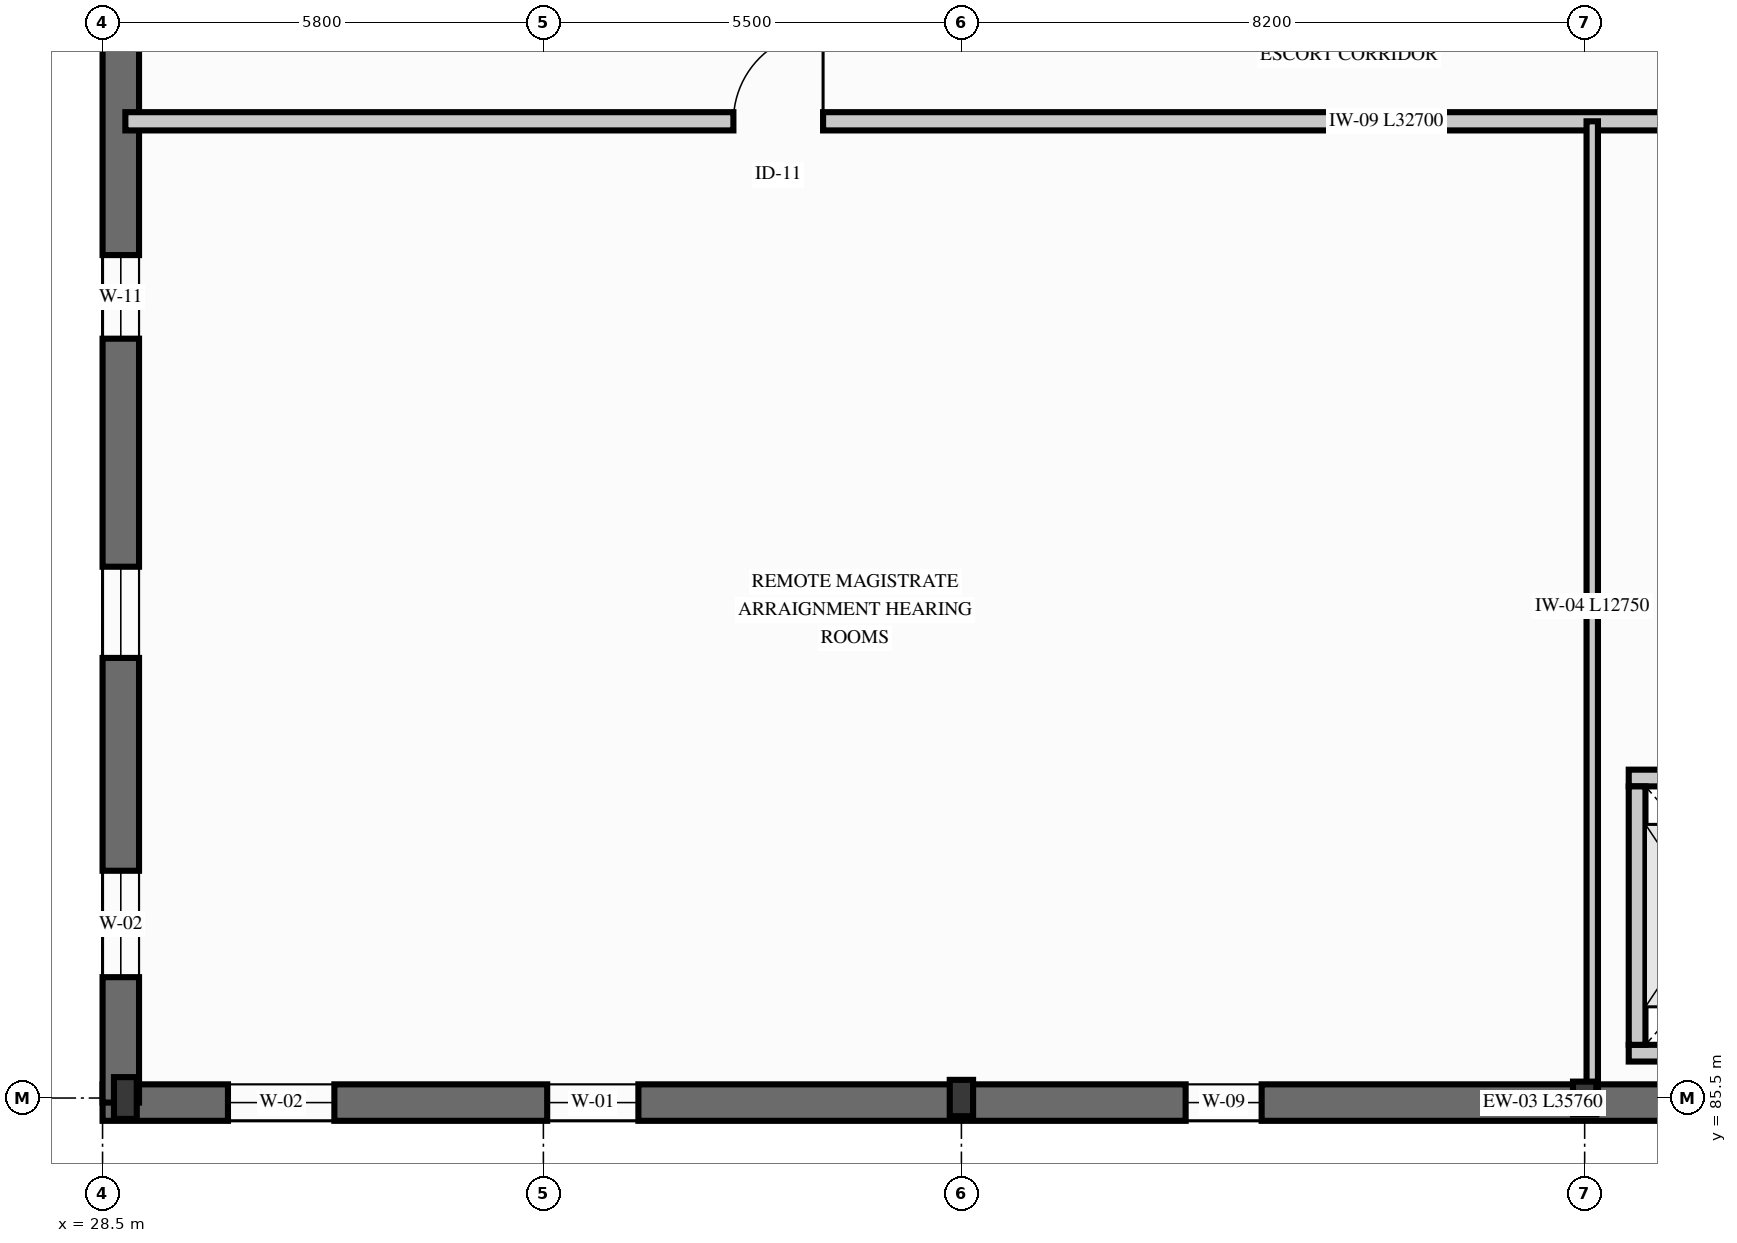
"""IFC4 building model, lengths in metres.
Left out: names, types, materials, properties, quantities, classifications, styles, units other than length and angle.
Written with IfcOpenShell. Run it as: python <this file> out.ifc"""

import sys

from ifc_helpers import new_model, si_unit, direction, frame, frame_2d, origin, origin_2d, place, context, subcontext, project, spatial, rectangle, i_section, extrude, element, fill, save


model = new_model("IFC4")
c1 = context("Model", 3, precision=1e-05, world=origin(), true_north=direction((0.0, 1.0)))
c2 = subcontext(c1, "Body", "Model", "MODEL_VIEW")
j1 = project(units=[si_unit("LENGTHUNIT", "METRE"), si_unit("PLANEANGLEUNIT", "RADIAN")], contexts=[c1])
p1 = place(None, origin())
s1 = spatial("IfcSite", under=j1, at=p1, CompositionType="ELEMENT")
p2 = place(p1, origin())
s2 = spatial("IfcBuilding", under=s1, at=p2, CompositionType="ELEMENT")
p3 = place(p2, frame((0.0, 0.0, 9.3)))
s3 = spatial("IfcBuildingStorey", under=s2, at=p3, CompositionType="ELEMENT", Elevation=9.3)
p4 = place(p3, frame((28.8, 85.5, 0.0), z_axis=(0.0, 0.0, 1.0), x_axis=(1.0, 0.0, 0.0)))
e1 = element("IfcColumn", 1, at=p4, inside=s3, PredefinedType="COLUMN", context=c2, shape_type="SweptSolid", body=[
    extrude(i_section(OverallWidth=0.3, OverallDepth=0.55, WebThickness=0.015, FlangeThickness=0.029, FilletRadius=0.027, at=origin_2d()), origin(), (0.0, 0.0, 1.0), 3.94),
])
p5 = place(p3, frame((39.8, 85.5, 0.0), z_axis=(0.0, 0.0, 1.0), x_axis=(1.0, 0.0, 0.0)))
e2 = element("IfcColumn", 2, at=p5, inside=s3, PredefinedType="COLUMN", context=c2, shape_type="SweptSolid", body=[
    extrude(i_section(OverallWidth=0.307, OverallDepth=0.478, WebThickness=0.021, FlangeThickness=0.04, FilletRadius=0.027, at=origin_2d()), origin(), (0.0, 0.0, 1.0), 3.94),
])
p6 = place(p3, frame((48.0, 85.5, 0.0), z_axis=(0.0, 0.0, 1.0), x_axis=(1.0, 0.0, 0.0)))
e3 = element("IfcColumn", 3, at=p6, inside=s3, PredefinedType="COLUMN", context=c2, shape_type="SweptSolid", body=[
    extrude(i_section(OverallWidth=0.307, OverallDepth=0.432, WebThickness=0.021, FlangeThickness=0.04, FilletRadius=0.027, at=origin_2d()), origin(), (0.0, 0.0, 1.0), 3.94),
])
p7 = place(p3, frame((28.5, 85.44, 0.0), z_axis=(0.0, 0.0, 1.0), x_axis=(1.0, 0.0, 0.0)))
e4 = element("IfcWall", 4, at=p7, inside=s3, PredefinedType="SOLIDWALL", context=c2, shape_type="SweptSolid", body=[
    extrude(rectangle(XDim=35.76, YDim=0.48, at=frame_2d((17.88, 0.0))), origin(), (0.0, 0.0, 1.0), 4.12),
])
p8 = place(p7, frame((1.65, 0.0, 0.95)))
e5 = element("IfcOpeningElement", 5, at=p8, cuts=e4, PredefinedType="OPENING", context=c2, shape_type="SweptSolid", body=[
    extrude(rectangle(XDim=1.4, YDim=2.2, at=frame_2d((0.7, 1.1))), frame((0.0, 0.25, 0.0), z_axis=(0.0, -1.0, 0.0), x_axis=(1.0, 0.0, 0.0)), (0.0, 0.0, 1.0), 0.5),
])
p9 = place(p7, frame((5.85, 0.0, 0.95)))
e6 = element("IfcOpeningElement", 6, at=p9, cuts=e4, PredefinedType="OPENING", context=c2, shape_type="SweptSolid", body=[
    extrude(rectangle(XDim=1.2, YDim=2.1, at=frame_2d((0.6, 1.05))), frame((0.0, 0.25, 0.0), z_axis=(0.0, -1.0, 0.0), x_axis=(1.0, 0.0, 0.0)), (0.0, 0.0, 1.0), 0.5),
])
p10 = place(p7, frame((14.25, 0.0, 0.95)))
e7 = element("IfcOpeningElement", 7, at=p10, cuts=e4, PredefinedType="OPENING", context=c2, shape_type="SweptSolid", body=[
    extrude(rectangle(XDim=1.0, YDim=1.6, at=frame_2d((0.5, 0.8))), frame((0.0, 0.25, 0.0), z_axis=(0.0, -1.0, 0.0), x_axis=(1.0, 0.0, 0.0)), (0.0, 0.0, 1.0), 0.5),
])
p11 = place(p7, frame((22.65, 0.0, 0.95)))
e8 = element("IfcOpeningElement", 8, at=p11, cuts=e4, PredefinedType="OPENING", context=c2, shape_type="SweptSolid", body=[
    extrude(rectangle(XDim=1.2, YDim=2.1, at=frame_2d((0.6, 1.05))), frame((0.0, 0.25, 0.0), z_axis=(0.0, -1.0, 0.0), x_axis=(1.0, 0.0, 0.0)), (0.0, 0.0, 1.0), 0.5),
])
p12 = place(p7, frame((31.05, 0.0, 0.95)))
e9 = element("IfcOpeningElement", 9, at=p12, cuts=e4, PredefinedType="OPENING", context=c2, shape_type="SweptSolid", body=[
    extrude(rectangle(XDim=1.0, YDim=1.6, at=frame_2d((0.5, 0.8))), frame((0.0, 0.25, 0.0), z_axis=(0.0, -1.0, 0.0), x_axis=(1.0, 0.0, 0.0)), (0.0, 0.0, 1.0), 0.5),
])
p13 = place(p3, frame((28.74, 85.44, 0.0), z_axis=(0.0, 0.0, 1.0), x_axis=(0.0, 1.0, 0.0)))
e10 = element("IfcWall", 10, at=p13, inside=s3, PredefinedType="SOLIDWALL", context=c2, shape_type="SweptSolid", body=[
    extrude(rectangle(XDim=31.27, YDim=0.48, at=frame_2d((15.635, 0.0))), origin(), (0.0, 0.0, 1.0), 4.12),
])
p14 = place(p13, frame((1.65, 0.0, 0.95)))
e11 = element("IfcOpeningElement", 11, at=p14, cuts=e10, PredefinedType="OPENING", context=c2, shape_type="SweptSolid", body=[
    extrude(rectangle(XDim=1.4, YDim=2.2, at=frame_2d((0.7, 1.1))), frame((0.0, 0.25, 0.0), z_axis=(0.0, -1.0, 0.0), x_axis=(1.0, 0.0, 0.0)), (0.0, 0.0, 1.0), 0.5),
])
p15 = place(p13, frame((5.85, 0.0, 0.95)))
e12 = element("IfcOpeningElement", 12, at=p15, cuts=e10, PredefinedType="OPENING", context=c2, shape_type="SweptSolid", body=[
    extrude(rectangle(XDim=1.2, YDim=2.1, at=frame_2d((0.6, 1.05))), frame((0.0, 0.25, 0.0), z_axis=(0.0, -1.0, 0.0), x_axis=(1.0, 0.0, 0.0)), (0.0, 0.0, 1.0), 0.5),
])
p16 = place(p13, frame((10.05, 0.0, 0.95)))
e13 = element("IfcOpeningElement", 13, at=p16, cuts=e10, PredefinedType="OPENING", context=c2, shape_type="SweptSolid", body=[
    extrude(rectangle(XDim=1.1, YDim=1.5, at=frame_2d((0.55, 0.75))), frame((0.0, 0.25, 0.0), z_axis=(0.0, -1.0, 0.0), x_axis=(1.0, 0.0, 0.0)), (0.0, 0.0, 1.0), 0.5),
])
p17 = place(p13, frame((18.45, 0.0, 0.95)))
e14 = element("IfcOpeningElement", 14, at=p17, cuts=e10, PredefinedType="OPENING", context=c2, shape_type="SweptSolid", body=[
    extrude(rectangle(XDim=1.4, YDim=2.2, at=frame_2d((0.7, 1.1))), frame((0.0, 0.25, 0.0), z_axis=(0.0, -1.0, 0.0), x_axis=(1.0, 0.0, 0.0)), (0.0, 0.0, 1.0), 0.5),
])
p18 = place(p13, frame((22.65, 0.0, 0.95)))
e15 = element("IfcOpeningElement", 15, at=p18, cuts=e10, PredefinedType="OPENING", context=c2, shape_type="SweptSolid", body=[
    extrude(rectangle(XDim=1.2, YDim=2.1, at=frame_2d((0.6, 1.05))), frame((0.0, 0.25, 0.0), z_axis=(0.0, -1.0, 0.0), x_axis=(1.0, 0.0, 0.0)), (0.0, 0.0, 1.0), 0.5),
])
p19 = place(p13, frame((26.85, 0.0, 0.95)))
e16 = element("IfcOpeningElement", 16, at=p19, cuts=e10, PredefinedType="OPENING", context=c2, shape_type="SweptSolid", body=[
    extrude(rectangle(XDim=1.1, YDim=1.5, at=frame_2d((0.55, 0.75))), frame((0.0, 0.25, 0.0), z_axis=(0.0, -1.0, 0.0), x_axis=(1.0, 0.0, 0.0)), (0.0, 0.0, 1.0), 0.5),
])
p20 = place(p3, frame((48.58, 86.09, 0.0), z_axis=(0.0, 0.0, 1.0), x_axis=(1.0, 0.0, 0.0)))
e17 = element("IfcWall", 17, at=p20, inside=s3, PredefinedType="PARTITIONING", context=c2, shape_type="SweptSolid", body=[
    extrude(rectangle(XDim=3.44, YDim=0.22, at=frame_2d((1.72, 0.0))), origin(), (0.0, 0.0, 1.0), 3.92),
])
p21 = place(p3, frame((48.58, 89.71, 0.0), z_axis=(0.0, 0.0, 1.0), x_axis=(1.0, 0.0, 0.0)))
e18 = element("IfcWall", 18, at=p21, inside=s3, PredefinedType="PARTITIONING", context=c2, shape_type="SweptSolid", body=[
    extrude(rectangle(XDim=3.44, YDim=0.22, at=frame_2d((1.72, 0.0))), origin(), (0.0, 0.0, 1.0), 3.92),
])
p22 = place(p21, frame((1.12, 0.0, 0.0)))
e19 = element("IfcOpeningElement", 19, at=p22, cuts=e18, PredefinedType="OPENING", context=c2, shape_type="SweptSolid", body=[
    extrude(rectangle(XDim=1.2, YDim=2.18, at=frame_2d((0.6, 1.09))), frame((0.0, 0.12, 0.0), z_axis=(0.0, -1.0, 0.0), x_axis=(1.0, 0.0, 0.0)), (0.0, 0.0, 1.0), 0.24),
])
p23 = place(p3, frame((48.69, 86.2, 0.0), z_axis=(0.0, 0.0, 1.0), x_axis=(0.0, 1.0, 0.0)))
e20 = element("IfcWall", 20, at=p23, inside=s3, PredefinedType="PARTITIONING", context=c2, shape_type="SweptSolid", body=[
    extrude(rectangle(XDim=3.4, YDim=0.22, at=frame_2d((1.7, 0.0))), origin(), (0.0, 0.0, 1.0), 3.92),
])
p24 = place(p3, frame((28.8, 98.35, 0.0), z_axis=(0.0, 0.0, 1.0), x_axis=(1.0, 0.0, 0.0)))
e21 = element("IfcWall", 21, at=p24, inside=s3, PredefinedType="PARTITIONING", context=c2, shape_type="SweptSolid", body=[
    extrude(rectangle(XDim=32.7, YDim=0.24, at=frame_2d((16.35, 0.0))), origin(), (0.0, 0.0, 1.0), 3.92),
])
p25 = place(p24, frame((8.0, 0.0, 0.0)))
e22 = element("IfcOpeningElement", 22, at=p25, cuts=e21, PredefinedType="OPENING", context=c2, shape_type="SweptSolid", body=[
    extrude(rectangle(XDim=1.18, YDim=2.24, at=frame_2d((0.59, 1.12))), frame((0.0, 0.13, 0.0), z_axis=(0.0, -1.0, 0.0), x_axis=(1.0, 0.0, 0.0)), (0.0, 0.0, 1.0), 0.26),
])
p26 = place(p24, frame((24.0, 0.0, 0.0)))
e23 = element("IfcOpeningElement", 23, at=p26, cuts=e21, PredefinedType="OPENING", context=c2, shape_type="SweptSolid", body=[
    extrude(rectangle(XDim=0.98, YDim=2.16, at=frame_2d((0.49, 1.08))), frame((0.0, 0.13, 0.0), z_axis=(0.0, -1.0, 0.0), x_axis=(1.0, 0.0, 0.0)), (0.0, 0.0, 1.0), 0.26),
])
p27 = place(p3, frame((48.1, 85.6, 0.0), z_axis=(0.0, 0.0, 1.0), x_axis=(0.0, 1.0, 0.0)))
e24 = element("IfcWall", 24, at=p27, inside=s3, PredefinedType="PARTITIONING", context=c2, shape_type="SweptSolid", body=[
    extrude(rectangle(XDim=12.75, YDim=0.15, at=frame_2d((6.375, 0.0))), origin(), (0.0, 0.0, 1.0), 3.92),
])
p28 = place(p14, origin())
e25 = element("IfcWindow", 25, at=p28, inside=s3, PartitioningType="SINGLE_PANEL", PredefinedType="WINDOW", context=c2, shape_type="SweptSolid", body=[
    extrude(rectangle(XDim=1.4, YDim=2.2, at=frame_2d((0.7, 1.1))), frame((0.0, 0.03, 0.0), z_axis=(0.0, -1.0, 0.0), x_axis=(1.0, 0.0, 0.0)), (0.0, 0.0, 1.0), 0.06),
])
fill(e11, e25)
p29 = place(p15, origin())
e26 = element("IfcWindow", 26, at=p29, inside=s3, PartitioningType="SINGLE_PANEL", PredefinedType="WINDOW", context=c2, shape_type="SweptSolid", body=[
    extrude(rectangle(XDim=1.2, YDim=2.1, at=frame_2d((0.6, 1.05))), frame((0.0, 0.03, 0.0), z_axis=(0.0, -1.0, 0.0), x_axis=(1.0, 0.0, 0.0)), (0.0, 0.0, 1.0), 0.06),
])
fill(e12, e26)
p30 = place(p16, origin())
e27 = element("IfcWindow", 27, at=p30, inside=s3, PartitioningType="SINGLE_PANEL", PredefinedType="WINDOW", context=c2, shape_type="SweptSolid", body=[
    extrude(rectangle(XDim=1.1, YDim=1.5, at=frame_2d((0.55, 0.75))), frame((0.0, 0.03, 0.0), z_axis=(0.0, -1.0, 0.0), x_axis=(1.0, 0.0, 0.0)), (0.0, 0.0, 1.0), 0.06),
])
fill(e13, e27)
p31 = place(p8, origin())
e28 = element("IfcWindow", 28, at=p31, inside=s3, PartitioningType="SINGLE_PANEL", PredefinedType="WINDOW", context=c2, shape_type="SweptSolid", body=[
    extrude(rectangle(XDim=1.4, YDim=2.2, at=frame_2d((0.7, 1.1))), frame((0.0, 0.03, 0.0), z_axis=(0.0, -1.0, 0.0), x_axis=(1.0, 0.0, 0.0)), (0.0, 0.0, 1.0), 0.06),
])
fill(e5, e28)
p32 = place(p9, origin())
e29 = element("IfcWindow", 29, at=p32, inside=s3, PartitioningType="SINGLE_PANEL", PredefinedType="WINDOW", context=c2, shape_type="SweptSolid", body=[
    extrude(rectangle(XDim=1.2, YDim=2.1, at=frame_2d((0.6, 1.05))), frame((0.0, 0.03, 0.0), z_axis=(0.0, -1.0, 0.0), x_axis=(1.0, 0.0, 0.0)), (0.0, 0.0, 1.0), 0.06),
])
fill(e6, e29)
p33 = place(p10, origin())
e30 = element("IfcWindow", 30, at=p33, inside=s3, PartitioningType="SINGLE_PANEL", PredefinedType="WINDOW", context=c2, shape_type="SweptSolid", body=[
    extrude(rectangle(XDim=1.0, YDim=1.6, at=frame_2d((0.5, 0.8))), frame((0.0, 0.03, 0.0), z_axis=(0.0, -1.0, 0.0), x_axis=(1.0, 0.0, 0.0)), (0.0, 0.0, 1.0), 0.06),
])
fill(e7, e30)
p34 = place(p3, frame((49.951, 101.091, 6.682), z_axis=(0.0, -0.159194766868, 0.987247196097), x_axis=(0.664211446788, -0.738011458859, -0.119005212275)))
p35 = place(p34, frame((0.275, -13.555, 0.0)))
p36 = place(p35, frame((0.0, 0.0, 0.02)))
e31 = element("IfcWindow", 31, at=p36, inside=s3, PartitioningType="SINGLE_PANEL", PredefinedType="SKYLIGHT", context=c2, shape_type="SweptSolid", body=[
    extrude(rectangle(XDim=1.5, YDim=1.8, at=origin_2d()), origin(), (0.0, 0.0, 1.0), 0.08),
])
p37 = place(p25, origin())
e32 = element("IfcDoor", 32, at=p37, inside=s3, OperationType="SINGLE_SWING_RIGHT", PredefinedType="DOOR", context=c2, shape_type="SweptSolid", body=[
    extrude(rectangle(XDim=1.18, YDim=2.24, at=frame_2d((0.59, 1.12))), frame((0.0, 0.025, 0.0), z_axis=(0.0, -1.0, 0.0), x_axis=(1.0, 0.0, 0.0)), (0.0, 0.0, 1.0), 0.05),
])
fill(e22, e32)
save(model, sys.argv[1])
